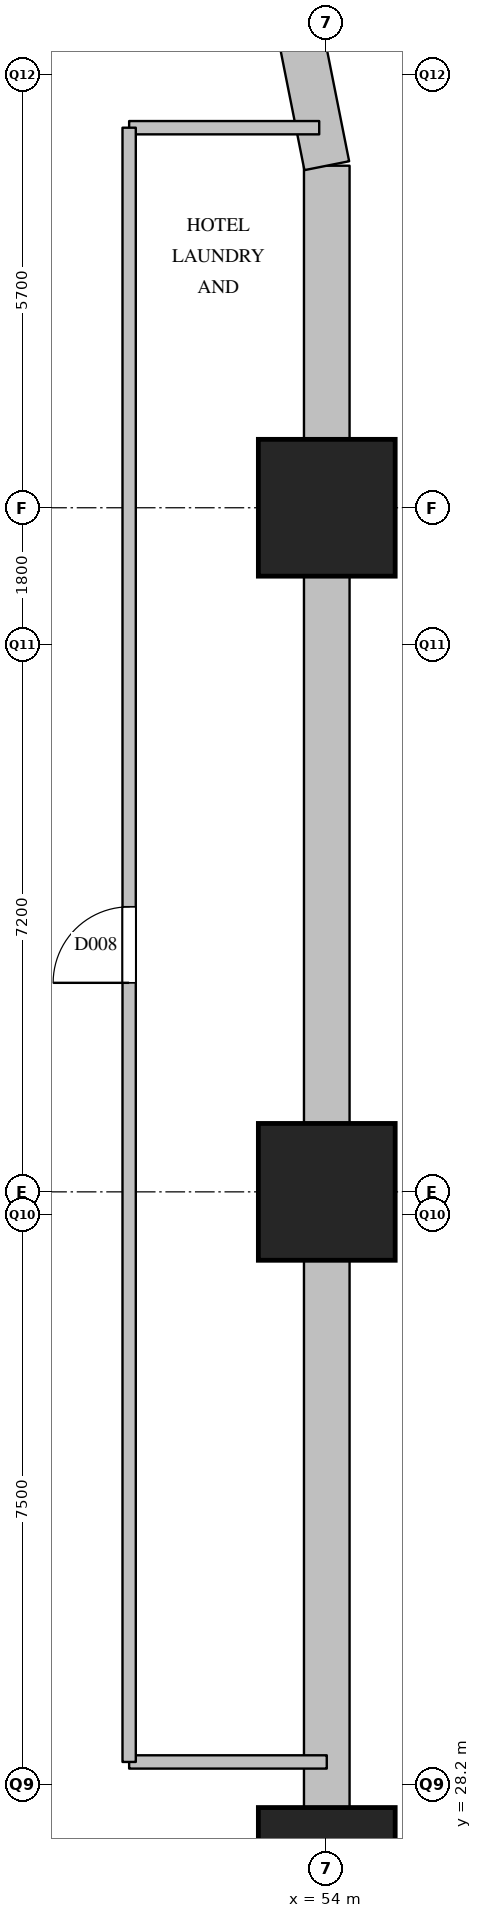
"""IFC4 building model, lengths in metres.
Left out: names, types, materials, properties, quantities, classifications, styles, units other than length and angle.
Written with IfcOpenShell. Run it as: python <this file> out.ifc"""

import sys

from ifc_helpers import new_model, si_unit, direction, frame, frame_2d, origin, origin_2d, place, context, subcontext, project, spatial, rectangle, extrude, element, fill, save


model = new_model("IFC4")
c1 = context("Model", 3, precision=1e-05, world=origin(), true_north=direction((0.0, 1.0)))
c2 = subcontext(c1, "Body", "Model", "MODEL_VIEW")
j1 = project(units=[si_unit("LENGTHUNIT", "METRE"), si_unit("PLANEANGLEUNIT", "RADIAN")], contexts=[c1])
p1 = place(None, origin())
s1 = spatial("IfcSite", under=j1, at=p1, CompositionType="ELEMENT")
p2 = place(p1, origin())
s2 = spatial("IfcBuilding", under=s1, at=p2, CompositionType="ELEMENT")
p3 = place(p2, frame((0.0, 0.0, -6.0)))
s3 = spatial("IfcBuildingStorey", under=s2, at=p3, CompositionType="ELEMENT", Elevation=-6.0)
for number, where, z_axis, x_axis in (
    (1, (54.0, 27.0, 0.0), (0.0, 0.0, 1.0), (1.0, 0.0, 0.0)),
    (2, (54.0, 36.0, 0.0), (0.0, 0.0, 1.0), (1.0, 0.0, 0.0)),
    (3, (54.0, 45.0, 0.0), (0.0, 0.0, 1.0), (1.0, 0.0, 0.0)),
):
    element("IfcColumn", number, at=place(p3, frame(where, z_axis=z_axis, x_axis=x_axis)), inside=s3, PredefinedType="COLUMN", context=c2, shape_type="SweptSolid", body=[
        extrude(rectangle(XDim=1.8, YDim=1.8, at=origin_2d()), origin(), (0.0, 0.0, 1.0), 6.0),
    ])
for number, where, z_axis, x_axis in (
    (4, (54.0, 27.9, 0.0), (0.0, 0.0, 1.0), (0.0, 1.0, 0.0)),
    (5, (54.0, 36.9, 0.0), (0.0, 0.0, 1.0), (0.0, 1.0, 0.0)),
):
    element("IfcWall", number, at=place(p3, frame(where, z_axis=z_axis, x_axis=x_axis)), inside=s3, PredefinedType="SOLIDWALL", context=c2, shape_type="SweptSolid", body=[
        extrude(rectangle(XDim=7.2, YDim=0.6, at=frame_2d((3.6, 0.0))), origin(), (0.0, 0.0, 1.0), 5.59),
    ])
p4 = place(p3, frame((54.0, 45.9, 0.0), z_axis=(0.0, 0.0, 1.0), x_axis=(0.0, 1.0, 0.0)))
e6 = element("IfcWall", 6, at=p4, inside=s3, PredefinedType="SOLIDWALL", context=c2, shape_type="SweptSolid", body=[
    extrude(rectangle(XDim=3.6, YDim=0.6, at=frame_2d((1.8, 0.0))), origin(), (0.0, 0.0, 1.0), 5.59),
])
p5 = place(p3, frame((54.0, 49.5, 0.0), z_axis=(0.0, 0.0, 1.0), x_axis=(-0.195073223687, 0.980788681317, 0.0)))
e7 = element("IfcWall", 7, at=p5, inside=s3, PredefinedType="SOLIDWALL", context=c2, shape_type="SweptSolid", body=[
    extrude(rectangle(XDim=1.756, YDim=0.6, at=frame_2d((0.878, 0.0))), origin(), (0.0, 0.0, 1.0), 5.59),
])
p6 = place(p3, frame((51.4, 28.5, 0.0), z_axis=(0.0, 0.0, 1.0), x_axis=(1.0, 0.0, 0.0)))
e8 = element("IfcWall", 8, at=p6, inside=s3, PredefinedType="PARTITIONING", context=c2, shape_type="SweptSolid", body=[
    extrude(rectangle(XDim=2.6, YDim=0.175, at=frame_2d((1.3, 0.0))), origin(), (0.0, 0.0, 1.0), 5.59),
])
p7 = place(p3, frame((51.4, 50.0, 0.0), z_axis=(0.0, 0.0, 1.0), x_axis=(1.0, 0.0, 0.0)))
e9 = element("IfcWall", 9, at=p7, inside=s3, PredefinedType="PARTITIONING", context=c2, shape_type="SweptSolid", body=[
    extrude(rectangle(XDim=2.5, YDim=0.175, at=frame_2d((1.25, 0.0))), origin(), (0.0, 0.0, 1.0), 5.59),
])
p8 = place(p3, frame((51.4, 28.5, 0.0), z_axis=(0.0, 0.0, 1.0), x_axis=(0.0, 1.0, 0.0)))
e10 = element("IfcWall", 10, at=p8, inside=s3, PredefinedType="PARTITIONING", context=c2, shape_type="SweptSolid", body=[
    extrude(rectangle(XDim=21.5, YDim=0.175, at=frame_2d((10.75, 0.0))), origin(), (0.0, 0.0, 1.0), 5.59),
])
p9 = place(p8, frame((10.25, 0.0, 0.0)))
e11 = element("IfcOpeningElement", 11, at=p9, cuts=e10, PredefinedType="OPENING", context=c2, shape_type="SweptSolid", body=[
    extrude(rectangle(XDim=1.0, YDim=2.1, at=frame_2d((0.5, 1.05))), frame((0.0, 0.097, 0.0), z_axis=(0.0, -1.0, 0.0), x_axis=(1.0, 0.0, 0.0)), (0.0, 0.0, 1.0), 0.195),
])
p10 = place(p9, origin())
e12 = element("IfcDoor", 12, at=p10, inside=s3, OperationType="SINGLE_SWING_LEFT", PredefinedType="DOOR", context=c2, shape_type="SweptSolid", body=[
    extrude(rectangle(XDim=1.0, YDim=2.1, at=frame_2d((0.5, 1.05))), frame((0.0, 0.025, 0.0), z_axis=(0.0, -1.0, 0.0), x_axis=(1.0, 0.0, 0.0)), (0.0, 0.0, 1.0), 0.05),
])
fill(e11, e12)
save(model, sys.argv[1])
